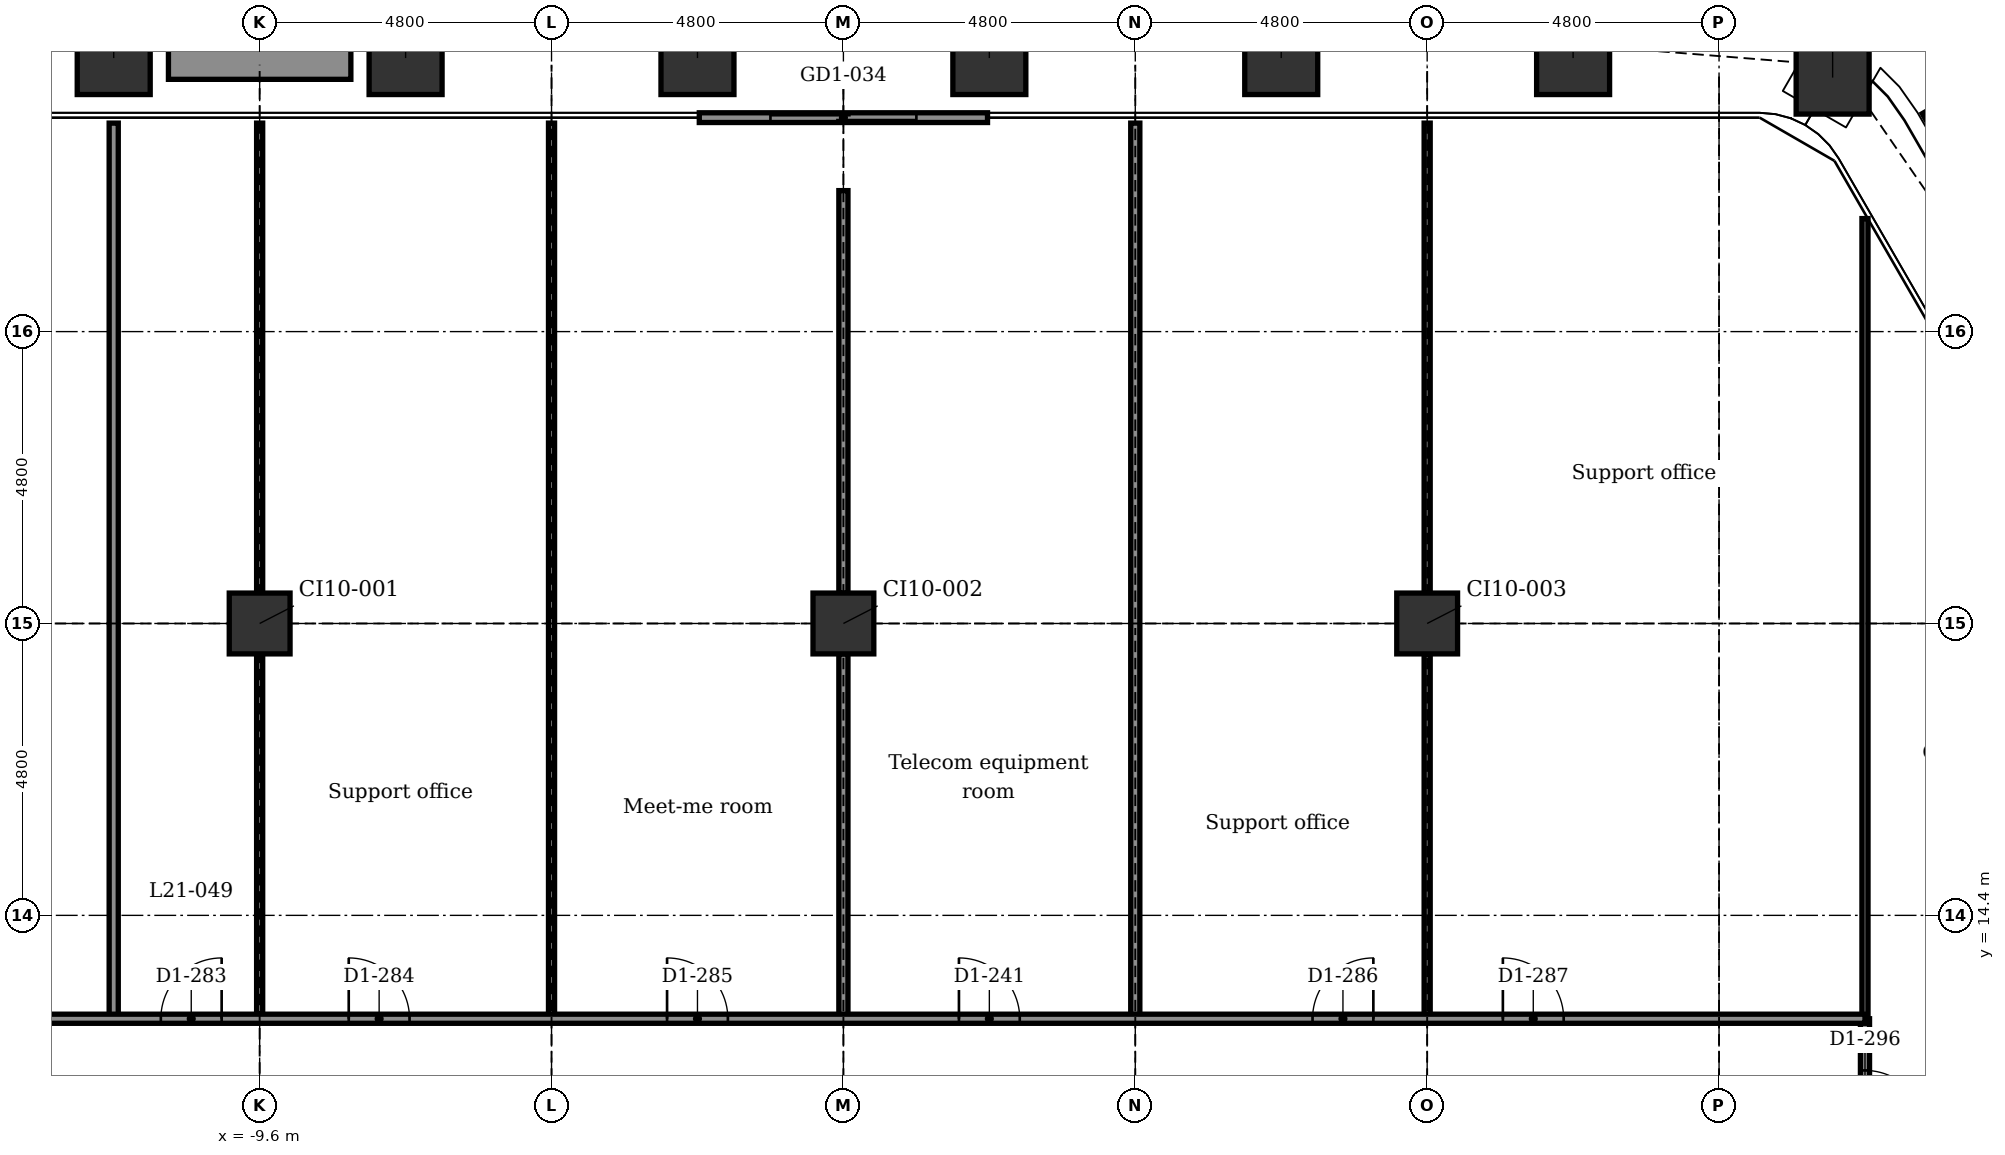
"""IFC4 building model, lengths in metres.
Left out: names, types, materials, properties, quantities, classifications, styles, units other than length and angle.
Written with IfcOpenShell. Run it as: python <this file> out.ifc"""

import sys

from ifc_helpers import new_model, si_unit, direction, frame, frame_2d, origin, origin_2d, place, context, subcontext, project, spatial, rectangle, extrude, element, fill, save


model = new_model("IFC4")
c1 = context("Model", 3, precision=1e-05, world=origin(), true_north=direction((0.0, 1.0)))
c2 = subcontext(c1, "Body", "Model", "MODEL_VIEW")
j1 = project(units=[si_unit("LENGTHUNIT", "METRE"), si_unit("PLANEANGLEUNIT", "RADIAN")], contexts=[c1])
p1 = place(None, origin())
s1 = spatial("IfcSite", under=j1, at=p1, CompositionType="ELEMENT")
p2 = place(p1, origin())
s2 = spatial("IfcBuilding", under=s1, at=p2, CompositionType="ELEMENT")
p3 = place(p2, frame((0.0, 0.0, 109.4)))
s3 = spatial("IfcBuildingStorey", under=s2, at=p3, CompositionType="ELEMENT", Elevation=109.4)
for number, where, z_axis, x_axis in (
    (1, (-12.0, 28.499, -0.2), (0.0, 0.0, 1.0), (1.0, 0.0, 0.0)),
    (2, (-7.2, 28.499, -0.2), (0.0, 0.0, 1.0), (1.0, 0.0, 0.0)),
    (3, (-2.4, 28.499, -0.2), (0.0, 0.0, 1.0), (1.0, 0.0, 0.0)),
    (4, (2.4, 28.499, -0.2), (0.0, 0.0, 1.0), (1.0, 0.0, 0.0)),
    (5, (7.2, 28.499, -0.2), (0.0, 0.0, 1.0), (1.0, 0.0, 0.0)),
    (6, (12.0, 28.499, -0.2), (0.0, 0.0, 1.0), (1.0, 0.0, 0.0)),
    (7, (16.268, 28.177, -0.2), (0.0, 0.0, 1.0), (0.5, 0.866, 0.0)),
):
    element("IfcColumn", number, at=place(p3, frame(where, z_axis=z_axis, x_axis=x_axis)), inside=s3, PredefinedType="COLUMN", context=c2, shape_type="SweptSolid", body=[
        extrude(rectangle(XDim=1.2, YDim=1.2, at=origin_2d()), origin(), (0.0, 0.0, 1.0), 4.5),
    ])
for number, where, z_axis, x_axis in (
    (8, (-9.6, 19.2, -0.2), (0.0, 0.0, 1.0), (1.0, 0.0, 0.0)),
    (9, (0.0, 19.2, -0.2), (0.0, 0.0, 1.0), (1.0, 0.0, 0.0)),
    (10, (9.6, 19.2, -0.2), (0.0, 0.0, 1.0), (1.0, 0.0, 0.0)),
):
    element("IfcColumn", number, at=place(p3, frame(where, z_axis=z_axis, x_axis=x_axis)), inside=s3, PredefinedType="COLUMN", context=c2, shape_type="SweptSolid", body=[
        extrude(rectangle(XDim=1.0, YDim=1.0, at=origin_2d()), origin(), (0.0, 0.0, 1.0), 4.5),
    ])
p4 = place(p3, frame((-2.37, 27.519, 0.0), z_axis=(0.0, 0.0, 1.0), x_axis=(1.0, 0.0, 0.0)))
e11 = element("IfcWall", 11, at=p4, inside=s3, PredefinedType="PARTITIONING", context=c2, shape_type="SweptSolid", body=[
    extrude(rectangle(XDim=4.74, YDim=0.16, at=frame_2d((2.37, 0.0))), origin(), (0.0, 0.0, 1.0), 4.3),
])
p5 = place(p4, frame((1.17, 0.0, 0.0)))
e12 = element("IfcOpeningElement", 12, at=p5, cuts=e11, PredefinedType="OPENING", context=c2, shape_type="SweptSolid", body=[
    extrude(rectangle(XDim=2.4, YDim=2.4, at=frame_2d((1.2, 1.2))), frame((0.0, 0.09, 0.0), z_axis=(0.0, -1.0, 0.0), x_axis=(1.0, 0.0, 0.0)), (0.0, 0.0, 1.0), 0.18),
])
p6 = place(p3, frame((-11.1, 28.448, 0.0), z_axis=(0.0, 0.0, 1.0), x_axis=(1.0, 0.0, 0.0)))
e13 = element("IfcWall", 13, at=p6, inside=s3, PredefinedType="USERDEFINED", context=c2, shape_type="SweptSolid", body=[
    extrude(rectangle(XDim=3.0, YDim=0.6, at=frame_2d((1.5, 0.0))), origin(), (0.0, 0.0, 1.0), 0.7),
])
p7 = place(p3, frame((16.8, 12.7, 0.0), z_axis=(0.0, 0.0, 1.0), x_axis=(0.0, 1.0, 0.0)))
e14 = element("IfcWall", 14, at=p7, inside=s3, PredefinedType="PARTITIONING", context=c2, shape_type="SweptSolid", body=[
    extrude(rectangle(XDim=13.158, YDim=0.1, at=frame_2d((6.579, 0.0))), origin(), (0.0, 0.0, 1.0), 4.3),
])
p8 = place(p3, frame((16.8, 3.95, 0.0), z_axis=(0.0, 0.0, 1.0), x_axis=(0.0, 1.0, 0.0)))
e15 = element("IfcWall", 15, at=p8, inside=s3, PredefinedType="PARTITIONING", context=c2, shape_type="SweptSolid", body=[
    extrude(rectangle(XDim=8.75, YDim=0.15, at=frame_2d((4.375, 0.0))), origin(), (0.0, 0.0, 1.0), 4.3),
])
p9 = place(p8, frame((1.275, 0.0, 0.0)))
e16 = element("IfcOpeningElement", 16, at=p9, cuts=e15, PredefinedType="OPENING", context=c2, shape_type="SweptSolid", body=[
    extrude(rectangle(XDim=1.0, YDim=2.1, at=frame_2d((0.5, 1.05))), frame((0.0, 0.085, 0.0), z_axis=(0.0, -1.0, 0.0), x_axis=(1.0, 0.0, 0.0)), (0.0, 0.0, 1.0), 0.17),
])
p10 = place(p8, frame((3.85, 0.0, 0.0)))
e17 = element("IfcOpeningElement", 17, at=p10, cuts=e15, PredefinedType="OPENING", context=c2, shape_type="SweptSolid", body=[
    extrude(rectangle(XDim=1.0, YDim=2.1, at=frame_2d((0.5, 1.05))), frame((0.0, 0.085, 0.0), z_axis=(0.0, -1.0, 0.0), x_axis=(1.0, 0.0, 0.0)), (0.0, 0.0, 1.0), 0.17),
])
p11 = place(p8, frame((6.9, 0.0, 0.0)))
e18 = element("IfcOpeningElement", 18, at=p11, cuts=e15, PredefinedType="OPENING", context=c2, shape_type="SweptSolid", body=[
    extrude(rectangle(XDim=1.0, YDim=2.1, at=frame_2d((0.5, 1.05))), frame((0.0, 0.085, 0.0), z_axis=(0.0, -1.0, 0.0), x_axis=(1.0, 0.0, 0.0)), (0.0, 0.0, 1.0), 0.17),
])
p12 = place(p3, frame((9.6, 12.7, 0.0), z_axis=(0.0, 0.0, 1.0), x_axis=(0.0, 1.0, 0.0)))
e19 = element("IfcWall", 19, at=p12, inside=s3, PredefinedType="PARTITIONING", context=c2, shape_type="SweptSolid", body=[
    extrude(rectangle(XDim=6.0, YDim=0.1, at=frame_2d((3.0, 0.0))), origin(), (0.0, 0.0, 1.0), 3.843),
])
p13 = place(p3, frame((9.6, 19.7, 0.0), z_axis=(0.0, 0.0, 1.0), x_axis=(0.0, 1.0, 0.0)))
e20 = element("IfcWall", 20, at=p13, inside=s3, PredefinedType="PARTITIONING", context=c2, shape_type="SweptSolid", body=[
    extrude(rectangle(XDim=7.729, YDim=0.1, at=frame_2d((3.864, 0.0))), origin(), (0.0, 0.0, 1.0), 3.843),
])
p14 = place(p3, frame((4.8, 12.7, 0.0), z_axis=(0.0, 0.0, 1.0), x_axis=(0.0, 1.0, 0.0)))
e21 = element("IfcWall", 21, at=p14, inside=s3, PredefinedType="PARTITIONING", context=c2, shape_type="SweptSolid", body=[
    extrude(rectangle(XDim=14.729, YDim=0.15, at=frame_2d((7.364, 0.0))), origin(), (0.0, 0.0, 1.0), 3.843),
])
p15 = place(p3, frame((0.0, 12.7, 0.0), z_axis=(0.0, 0.0, 1.0), x_axis=(0.0, 1.0, 0.0)))
e22 = element("IfcWall", 22, at=p15, inside=s3, PredefinedType="PARTITIONING", context=c2, shape_type="SweptSolid", body=[
    extrude(rectangle(XDim=6.0, YDim=0.15, at=frame_2d((3.0, 0.0))), origin(), (0.0, 0.0, 1.0), 3.843),
])
p16 = place(p3, frame((0.0, 19.7, 0.0), z_axis=(0.0, 0.0, 1.0), x_axis=(0.0, 1.0, 0.0)))
e23 = element("IfcWall", 23, at=p16, inside=s3, PredefinedType="PARTITIONING", context=c2, shape_type="SweptSolid", body=[
    extrude(rectangle(XDim=6.619, YDim=0.15, at=frame_2d((3.309, 0.0))), origin(), (0.0, 0.0, 1.0), 3.843),
])
p17 = place(p3, frame((-4.8, 12.7, 0.0), z_axis=(0.0, 0.0, 1.0), x_axis=(0.0, 1.0, 0.0)))
e24 = element("IfcWall", 24, at=p17, inside=s3, PredefinedType="PARTITIONING", context=c2, shape_type="SweptSolid", body=[
    extrude(rectangle(XDim=14.729, YDim=0.1, at=frame_2d((7.364, 0.0))), origin(), (0.0, 0.0, 1.0), 3.843),
])
p18 = place(p3, frame((-9.6, 12.7, 0.0), z_axis=(0.0, 0.0, 1.0), x_axis=(0.0, 1.0, 0.0)))
e25 = element("IfcWall", 25, at=p18, inside=s3, PredefinedType="PARTITIONING", context=c2, shape_type="SweptSolid", body=[
    extrude(rectangle(XDim=6.0, YDim=0.1, at=frame_2d((3.0, 0.0))), origin(), (0.0, 0.0, 1.0), 3.843),
])
p19 = place(p3, frame((-9.6, 19.7, 0.0), z_axis=(0.0, 0.0, 1.0), x_axis=(0.0, 1.0, 0.0)))
e26 = element("IfcWall", 26, at=p19, inside=s3, PredefinedType="PARTITIONING", context=c2, shape_type="SweptSolid", body=[
    extrude(rectangle(XDim=7.729, YDim=0.1, at=frame_2d((3.864, 0.0))), origin(), (0.0, 0.0, 1.0), 3.843),
])
p20 = place(p3, frame((-12.0, 12.7, 0.0), z_axis=(0.0, 0.0, 1.0), x_axis=(0.0, 1.0, 0.0)))
e27 = element("IfcWall", 27, at=p20, inside=s3, PredefinedType="PARTITIONING", context=c2, shape_type="SweptSolid", body=[
    extrude(rectangle(XDim=14.729, YDim=0.15, at=frame_2d((7.364, 0.0))), origin(), (0.0, 0.0, 1.0), 4.3),
])
p21 = place(p3, frame((-16.8, 12.7, 0.0), z_axis=(0.0, 0.0, 1.0), x_axis=(1.0, 0.0, 0.0)))
e28 = element("IfcWall", 28, at=p21, inside=s3, PredefinedType="PARTITIONING", context=c2, shape_type="SweptSolid", body=[
    extrude(rectangle(XDim=33.6, YDim=0.15, at=frame_2d((16.8, 0.0))), origin(), (0.0, 0.0, 1.0), 4.3),
])
p22 = place(p21, frame((1.9, 0.0, 0.0)))
e29 = element("IfcOpeningElement", 29, at=p22, cuts=e28, PredefinedType="OPENING", context=c2, shape_type="SweptSolid", body=[
    extrude(rectangle(XDim=1.0, YDim=2.1, at=frame_2d((0.5, 1.05))), frame((0.0, 0.085, 0.0), z_axis=(0.0, -1.0, 0.0), x_axis=(1.0, 0.0, 0.0)), (0.0, 0.0, 1.0), 0.17),
])
p23 = place(p21, frame((5.575, 0.0, 0.0)))
e30 = element("IfcOpeningElement", 30, at=p23, cuts=e28, PredefinedType="OPENING", context=c2, shape_type="SweptSolid", body=[
    extrude(rectangle(XDim=1.0, YDim=2.1, at=frame_2d((0.5, 1.05))), frame((0.0, 0.085, 0.0), z_axis=(0.0, -1.0, 0.0), x_axis=(1.0, 0.0, 0.0)), (0.0, 0.0, 1.0), 0.17),
])
p24 = place(p21, frame((8.665, 0.0, 0.0)))
e31 = element("IfcOpeningElement", 31, at=p24, cuts=e28, PredefinedType="OPENING", context=c2, shape_type="SweptSolid", body=[
    extrude(rectangle(XDim=1.0, YDim=2.1, at=frame_2d((0.5, 1.05))), frame((0.0, 0.085, 0.0), z_axis=(0.0, -1.0, 0.0), x_axis=(1.0, 0.0, 0.0)), (0.0, 0.0, 1.0), 0.17),
])
p25 = place(p21, frame((13.9, 0.0, 0.0)))
e32 = element("IfcOpeningElement", 32, at=p25, cuts=e28, PredefinedType="OPENING", context=c2, shape_type="SweptSolid", body=[
    extrude(rectangle(XDim=1.0, YDim=2.1, at=frame_2d((0.5, 1.05))), frame((0.0, 0.085, 0.0), z_axis=(0.0, -1.0, 0.0), x_axis=(1.0, 0.0, 0.0)), (0.0, 0.0, 1.0), 0.17),
])
p26 = place(p21, frame((18.7, 0.0, 0.0)))
e33 = element("IfcOpeningElement", 33, at=p26, cuts=e28, PredefinedType="OPENING", context=c2, shape_type="SweptSolid", body=[
    extrude(rectangle(XDim=1.0, YDim=2.1, at=frame_2d((0.5, 1.05))), frame((0.0, 0.085, 0.0), z_axis=(0.0, -1.0, 0.0), x_axis=(1.0, 0.0, 0.0)), (0.0, 0.0, 1.0), 0.17),
])
p27 = place(p21, frame((24.515, 0.0, 0.0)))
e34 = element("IfcOpeningElement", 34, at=p27, cuts=e28, PredefinedType="OPENING", context=c2, shape_type="SweptSolid", body=[
    extrude(rectangle(XDim=1.0, YDim=2.1, at=frame_2d((0.5, 1.05))), frame((0.0, 0.085, 0.0), z_axis=(0.0, -1.0, 0.0), x_axis=(1.0, 0.0, 0.0)), (0.0, 0.0, 1.0), 0.17),
])
p28 = place(p21, frame((27.645, 0.0, 0.0)))
e35 = element("IfcOpeningElement", 35, at=p28, cuts=e28, PredefinedType="OPENING", context=c2, shape_type="SweptSolid", body=[
    extrude(rectangle(XDim=1.0, YDim=2.1, at=frame_2d((0.5, 1.05))), frame((0.0, 0.085, 0.0), z_axis=(0.0, -1.0, 0.0), x_axis=(1.0, 0.0, 0.0)), (0.0, 0.0, 1.0), 0.17),
])
p29 = place(p5, origin())
e36 = element("IfcDoor", 36, at=p29, inside=s3, OperationType="DOUBLE_DOOR_SLIDING", PredefinedType="DOOR", context=c2, shape_type="SweptSolid", body=[
    extrude(rectangle(XDim=2.4, YDim=2.4, at=frame_2d((1.2, 1.2))), frame((0.0, 0.025, 0.0), z_axis=(0.0, -1.0, 0.0), x_axis=(1.0, 0.0, 0.0)), (0.0, 0.0, 1.0), 0.05),
])
fill(e12, e36)
p30 = place(p23, origin())
e37 = element("IfcDoor", 37, at=p30, inside=s3, OperationType="SINGLE_SWING_RIGHT", PredefinedType="DOOR", context=c2, shape_type="SweptSolid", body=[
    extrude(rectangle(XDim=1.0, YDim=2.1, at=frame_2d((0.5, 1.05))), frame((0.0, 0.025, 0.0), z_axis=(0.0, -1.0, 0.0), x_axis=(1.0, 0.0, 0.0)), (0.0, 0.0, 1.0), 0.05),
])
fill(e30, e37)
p31 = place(p24, origin())
e38 = element("IfcDoor", 38, at=p31, inside=s3, OperationType="SINGLE_SWING_LEFT", PredefinedType="DOOR", context=c2, shape_type="SweptSolid", body=[
    extrude(rectangle(XDim=1.0, YDim=2.1, at=frame_2d((0.5, 1.05))), frame((0.0, 0.025, 0.0), z_axis=(0.0, -1.0, 0.0), x_axis=(1.0, 0.0, 0.0)), (0.0, 0.0, 1.0), 0.05),
])
fill(e31, e38)
p32 = place(p25, origin())
e39 = element("IfcDoor", 39, at=p32, inside=s3, OperationType="SINGLE_SWING_LEFT", PredefinedType="DOOR", context=c2, shape_type="SweptSolid", body=[
    extrude(rectangle(XDim=1.0, YDim=2.1, at=frame_2d((0.5, 1.05))), frame((0.0, 0.025, 0.0), z_axis=(0.0, -1.0, 0.0), x_axis=(1.0, 0.0, 0.0)), (0.0, 0.0, 1.0), 0.05),
])
fill(e32, e39)
p33 = place(p26, origin())
e40 = element("IfcDoor", 40, at=p33, inside=s3, OperationType="SINGLE_SWING_LEFT", PredefinedType="DOOR", context=c2, shape_type="SweptSolid", body=[
    extrude(rectangle(XDim=1.0, YDim=2.1, at=frame_2d((0.5, 1.05))), frame((0.0, 0.025, 0.0), z_axis=(0.0, -1.0, 0.0), x_axis=(1.0, 0.0, 0.0)), (0.0, 0.0, 1.0), 0.05),
])
fill(e33, e40)
p34 = place(p27, origin())
e41 = element("IfcDoor", 41, at=p34, inside=s3, OperationType="SINGLE_SWING_RIGHT", PredefinedType="DOOR", context=c2, shape_type="SweptSolid", body=[
    extrude(rectangle(XDim=1.0, YDim=2.1, at=frame_2d((0.5, 1.05))), frame((0.0, 0.025, 0.0), z_axis=(0.0, -1.0, 0.0), x_axis=(1.0, 0.0, 0.0)), (0.0, 0.0, 1.0), 0.05),
])
fill(e34, e41)
p35 = place(p28, origin())
e42 = element("IfcDoor", 42, at=p35, inside=s3, OperationType="SINGLE_SWING_LEFT", PredefinedType="DOOR", context=c2, shape_type="SweptSolid", body=[
    extrude(rectangle(XDim=1.0, YDim=2.1, at=frame_2d((0.5, 1.05))), frame((0.0, 0.025, 0.0), z_axis=(0.0, -1.0, 0.0), x_axis=(1.0, 0.0, 0.0)), (0.0, 0.0, 1.0), 0.05),
])
fill(e35, e42)
p36 = place(p11, frame((1.0, 0.0, 0.0), z_axis=(0.0, 0.0, 1.0), x_axis=(-1.0, 0.0, 0.0)))
e43 = element("IfcDoor", 43, at=p36, inside=s3, OperationType="SINGLE_SWING_LEFT", PredefinedType="DOOR", context=c2, shape_type="SweptSolid", body=[
    extrude(rectangle(XDim=1.0, YDim=2.1, at=frame_2d((0.5, 1.05))), frame((0.0, 0.025, 0.0), z_axis=(0.0, -1.0, 0.0), x_axis=(1.0, 0.0, 0.0)), (0.0, 0.0, 1.0), 0.05),
])
fill(e18, e43)
save(model, sys.argv[1])
